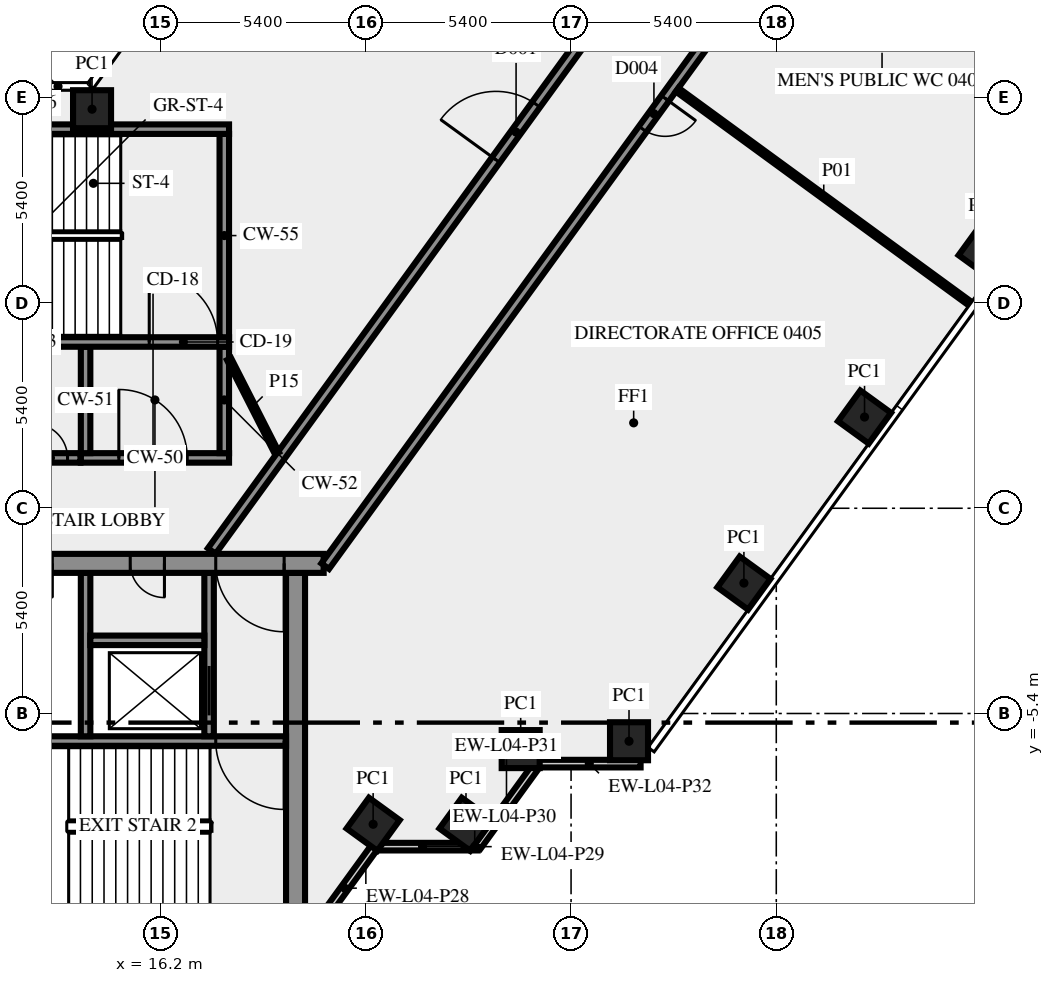
"""IFC4 building model, lengths in metres.
Left out: names, types, materials, properties, quantities, classifications, styles, units other than length and angle.
Written with IfcOpenShell. Run it as: python <this file> out.ifc"""

import sys

from ifc_helpers import new_model, si_unit, direction, frame, frame_2d, origin, origin_2d, place, context, subcontext, project, spatial, rectangle, extrude, element, fill, save


model = new_model("IFC4")
c1 = context("Model", 3, precision=1e-05, world=origin(), true_north=direction((0.0, 1.0)))
c2 = subcontext(c1, "Body", "Model", "MODEL_VIEW")
j1 = project(units=[si_unit("LENGTHUNIT", "METRE"), si_unit("PLANEANGLEUNIT", "RADIAN")], contexts=[c1])
p1 = place(None, origin())
s1 = spatial("IfcSite", under=j1, at=p1, CompositionType="ELEMENT")
p2 = place(p1, origin())
s2 = spatial("IfcBuilding", under=s1, at=p2, CompositionType="ELEMENT")
p3 = place(p2, frame((0.0, 0.0, 20.5)))
s3 = spatial("IfcBuildingStorey", under=s2, at=p3, CompositionType="ELEMENT", Elevation=20.5)
for number, where, z_axis, x_axis in (
    (1, (21.792, -8.315, 0.0), (0.0, 0.0, 1.0), (0.588, 0.809, 0.0)),
    (2, (24.235, -8.315, 0.0), (0.0, 0.0, 1.0), (0.588, 0.809, 0.0)),
    (3, (25.674, -6.337, 0.0), (0.0, 0.0, 1.0), (1.0, 0.0, 0.0)),
    (4, (28.525, -6.13, 0.0), (0.0, 0.0, 1.0), (1.0, 0.0, 0.0)),
    (5, (31.548, -1.969, 0.0), (0.0, 0.0, 1.0), (0.588, 0.809, 0.0)),
    (6, (34.722, 2.4, 0.0), (0.0, 0.0, 1.0), (0.588, 0.809, 0.0)),
    (7, (37.896, 6.769, 0.0), (0.0, 0.0, 1.0), (0.588, 0.809, 0.0)),
    (8, (14.395, 10.5, 0.0), (0.0, 0.0, 1.0), (-1.0, 0.0, 0.0)),
):
    element("IfcColumn", number, at=place(p3, frame(where, z_axis=z_axis, x_axis=x_axis)), inside=s3, PredefinedType="COLUMN", context=c2, shape_type="SweptSolid", body=[
        extrude(rectangle(XDim=1.0, YDim=1.0, at=origin_2d()), origin(), (0.0, 0.0, 1.0), 3.9),
    ])
p4 = place(p3, frame((20.253, -11.083, 0.0), z_axis=(0.0, 0.0, 1.0), x_axis=(0.587766567315, 0.809030569476, 0.0)))
e9 = element("IfcWall", 9, at=p4, inside=s3, PredefinedType="SOLIDWALL", context=c2, shape_type="SweptSolid", body=[
    extrude(rectangle(XDim=2.688, YDim=0.2, at=frame_2d((1.344, 0.0))), origin(), (0.0, 0.0, 1.0), 3.9),
])
p5 = place(p3, frame((21.943, -8.904, 0.0), z_axis=(0.0, 0.0, 1.0), x_axis=(1.0, 0.0, 0.0)))
e10 = element("IfcWall", 10, at=p5, inside=s3, PredefinedType="SOLIDWALL", context=c2, shape_type="SweptSolid", body=[
    extrude(rectangle(XDim=2.298, YDim=0.2, at=frame_2d((1.149, 0.0))), origin(), (0.0, 0.0, 1.0), 3.9),
])
p6 = place(p3, frame((24.387, -8.904, 0.0), z_axis=(0.0, 0.0, 1.0), x_axis=(1.0, 0.0, 0.0)))
e11 = element("IfcWall", 11, at=p6, inside=s3, PredefinedType="SOLIDWALL", context=c2, shape_type="SweptSolid", body=[
    extrude(rectangle(XDim=0.156, YDim=0.2, at=frame_2d((0.078, 0.0))), origin(), (0.0, 0.0, 1.0), 3.9),
])
p7 = place(p3, frame((24.54, -8.899, 0.0), z_axis=(0.0, 0.0, 1.0), x_axis=(0.587700286833, 0.809078718578, 0.0)))
e12 = element("IfcWall", 12, at=p7, inside=s3, PredefinedType="SOLIDWALL", context=c2, shape_type="SweptSolid", body=[
    extrude(rectangle(XDim=2.587, YDim=0.2, at=frame_2d((1.293, 0.0))), origin(), (0.0, 0.0, 1.0), 3.9),
])
p8 = place(p3, frame((26.13, -6.719, 0.0), z_axis=(0.0, 0.0, 1.0), x_axis=(1.0, 0.0, 0.0)))
e13 = element("IfcWall", 13, at=p8, inside=s3, PredefinedType="SOLIDWALL", context=c2, shape_type="SweptSolid", body=[
    extrude(rectangle(XDim=2.7, YDim=0.2, at=frame_2d((1.35, 0.0))), origin(), (0.0, 0.0, 1.0), 3.9),
])
p9 = place(p3, frame((19.75, -10.5, 0.0), z_axis=(0.0, 0.0, 1.0), x_axis=(0.0, 1.0, 0.0)))
e14 = element("IfcWall", 14, at=p9, inside=s3, PredefinedType="SHEAR", context=c2, shape_type="SweptSolid", body=[
    extrude(rectangle(XDim=8.8, YDim=0.5, at=frame_2d((4.4, 0.0))), origin(), (0.0, 0.0, 1.0), 3.9),
])
p10 = place(p3, frame((19.5, -6.125, 0.0), z_axis=(0.0, 0.0, 1.0), x_axis=(-1.0, 0.0, 0.0)))
e15 = element("IfcWall", 15, at=p10, inside=s3, PredefinedType="SHEAR", context=c2, shape_type="SweptSolid", body=[
    extrude(rectangle(XDim=8.05, YDim=0.25, at=frame_2d((4.025, 0.0))), origin(), (0.0, 0.0, 1.0), 3.9),
])
p11 = place(p10, frame((0.05, 0.0, 0.0)))
e16 = element("IfcOpeningElement", 16, at=p11, cuts=e15, PredefinedType="OPENING", context=c2, shape_type="SweptSolid", body=[
    extrude(rectangle(XDim=1.8, YDim=2.1, at=frame_2d((0.9, 1.05))), frame((0.0, 0.135, 0.0), z_axis=(0.0, -1.0, 0.0), x_axis=(1.0, 0.0, 0.0)), (0.0, 0.0, 1.0), 0.27),
])
p12 = place(p3, frame((14.225, -6.0, 0.0), z_axis=(0.0, 0.0, 1.0), x_axis=(0.0, 1.0, 0.0)))
e17 = element("IfcWall", 17, at=p12, inside=s3, PredefinedType="SHEAR", context=c2, shape_type="SweptSolid", body=[
    extrude(rectangle(XDim=4.3, YDim=0.25, at=frame_2d((2.15, 0.0))), origin(), (0.0, 0.0, 1.0), 3.9),
])
p13 = place(p3, frame((17.475, -6.0, 0.0), z_axis=(0.0, 0.0, 1.0), x_axis=(0.0, 1.0, 0.0)))
e18 = element("IfcWall", 18, at=p13, inside=s3, PredefinedType="SHEAR", context=c2, shape_type="SweptSolid", body=[
    extrude(rectangle(XDim=4.3, YDim=0.25, at=frame_2d((2.15, 0.0))), origin(), (0.0, 0.0, 1.0), 3.9),
])
p14 = place(p13, frame((0.55, 0.0, 0.0)))
e19 = element("IfcOpeningElement", 19, at=p14, cuts=e18, PredefinedType="OPENING", context=c2, shape_type="SweptSolid", body=[
    extrude(rectangle(XDim=1.3, YDim=2.1, at=frame_2d((0.65, 1.05))), frame((0.0, 0.135, 0.0), z_axis=(0.0, -1.0, 0.0), x_axis=(1.0, 0.0, 0.0)), (0.0, 0.0, 1.0), 0.27),
])
p15 = place(p3, frame((14.35, -3.475, 0.0), z_axis=(0.0, 0.0, 1.0), x_axis=(1.0, 0.0, 0.0)))
e20 = element("IfcWall", 20, at=p15, inside=s3, PredefinedType="SHEAR", context=c2, shape_type="SweptSolid", body=[
    extrude(rectangle(XDim=3.0, YDim=0.25, at=frame_2d((1.5, 0.0))), origin(), (0.0, 0.0, 1.0), 3.9),
])
p16 = place(p3, frame((20.49, -1.45, 0.0), z_axis=(0.0, 0.0, 1.0), x_axis=(-1.0, 0.0, 0.0)))
e21 = element("IfcWall", 21, at=p16, inside=s3, PredefinedType="SHEAR", context=c2, shape_type="SweptSolid", body=[
    extrude(rectangle(XDim=40.98, YDim=0.5, at=frame_2d((20.49, 0.0))), origin(), (0.0, 0.0, 1.0), 3.9),
])
p17 = place(p16, frame((38.14, 0.0, 0.0)))
e22 = element("IfcOpeningElement", 22, at=p17, cuts=e21, PredefinedType="OPENING", context=c2, shape_type="SweptSolid", body=[
    extrude(rectangle(XDim=1.8, YDim=2.1, at=frame_2d((0.9, 1.05))), frame((0.0, 0.26, 0.0), z_axis=(0.0, -1.0, 0.0), x_axis=(1.0, 0.0, 0.0)), (0.0, 0.0, 1.0), 0.52),
])
p18 = place(p16, frame((36.728, 0.0, 0.0)))
e23 = element("IfcOpeningElement", 23, at=p18, cuts=e21, PredefinedType="OPENING", context=c2, shape_type="SweptSolid", body=[
    extrude(rectangle(XDim=0.8, YDim=2.1, at=frame_2d((0.4, 1.05))), frame((0.0, 0.26, 0.0), z_axis=(0.0, -1.0, 0.0), x_axis=(1.0, 0.0, 0.0)), (0.0, 0.0, 1.0), 0.52),
])
p19 = place(p16, frame((35.153, 0.0, 0.0)))
e24 = element("IfcOpeningElement", 24, at=p19, cuts=e21, PredefinedType="OPENING", context=c2, shape_type="SweptSolid", body=[
    extrude(rectangle(XDim=0.8, YDim=2.1, at=frame_2d((0.4, 1.05))), frame((0.0, 0.26, 0.0), z_axis=(0.0, -1.0, 0.0), x_axis=(1.0, 0.0, 0.0)), (0.0, 0.0, 1.0), 0.52),
])
p20 = place(p16, frame((32.94, 0.0, 0.0)))
e25 = element("IfcOpeningElement", 25, at=p20, cuts=e21, PredefinedType="OPENING", context=c2, shape_type="SweptSolid", body=[
    extrude(rectangle(XDim=0.9, YDim=2.1, at=frame_2d((0.45, 1.05))), frame((0.0, 0.26, 0.0), z_axis=(0.0, -1.0, 0.0), x_axis=(1.0, 0.0, 0.0)), (0.0, 0.0, 1.0), 0.52),
])
p21 = place(p16, frame((19.59, 0.0, 0.0)))
e26 = element("IfcOpeningElement", 26, at=p21, cuts=e21, PredefinedType="OPENING", context=c2, shape_type="SweptSolid", body=[
    extrude(rectangle(XDim=2.0, YDim=2.1, at=frame_2d((1.0, 1.05))), frame((0.0, 0.26, 0.0), z_axis=(0.0, -1.0, 0.0), x_axis=(1.0, 0.0, 0.0)), (0.0, 0.0, 1.0), 0.52),
])
p22 = place(p16, frame((7.14, 0.0, 0.0)))
e27 = element("IfcOpeningElement", 27, at=p22, cuts=e21, PredefinedType="OPENING", context=c2, shape_type="SweptSolid", body=[
    extrude(rectangle(XDim=0.9, YDim=2.1, at=frame_2d((0.45, 1.05))), frame((0.0, 0.26, 0.0), z_axis=(0.0, -1.0, 0.0), x_axis=(1.0, 0.0, 0.0)), (0.0, 0.0, 1.0), 0.52),
])
p23 = place(p16, frame((4.19, 0.0, 0.0)))
e28 = element("IfcOpeningElement", 28, at=p23, cuts=e21, PredefinedType="OPENING", context=c2, shape_type="SweptSolid", body=[
    extrude(rectangle(XDim=0.9, YDim=2.1, at=frame_2d((0.45, 1.05))), frame((0.0, 0.26, 0.0), z_axis=(0.0, -1.0, 0.0), x_axis=(1.0, 0.0, 0.0)), (0.0, 0.0, 1.0), 0.52),
])
p24 = place(p16, frame((1.04, 0.0, 0.0)))
e29 = element("IfcOpeningElement", 29, at=p24, cuts=e21, PredefinedType="OPENING", context=c2, shape_type="SweptSolid", body=[
    extrude(rectangle(XDim=1.8, YDim=2.1, at=frame_2d((0.9, 1.05))), frame((0.0, 0.26, 0.0), z_axis=(0.0, -1.0, 0.0), x_axis=(1.0, 0.0, 0.0)), (0.0, 0.0, 1.0), 0.52),
])
p25 = place(p3, frame((14.1, 1.325, 0.0), z_axis=(0.0, 0.0, 1.0), x_axis=(1.0, 0.0, 0.0)))
e30 = element("IfcWall", 30, at=p25, inside=s3, PredefinedType="SHEAR", context=c2, shape_type="SweptSolid", body=[
    extrude(rectangle(XDim=3.9, YDim=0.25, at=frame_2d((1.95, 0.0))), origin(), (0.0, 0.0, 1.0), 3.9),
])
p26 = place(p25, frame((1.0, 0.0, 0.0)))
e31 = element("IfcOpeningElement", 31, at=p26, cuts=e30, PredefinedType="OPENING", context=c2, shape_type="SweptSolid", body=[
    extrude(rectangle(XDim=1.8, YDim=2.1, at=frame_2d((0.9, 1.05))), frame((0.0, 0.135, 0.0), z_axis=(0.0, -1.0, 0.0), x_axis=(1.0, 0.0, 0.0)), (0.0, 0.0, 1.0), 0.27),
])
for number, where, z_axis, x_axis in (
    (32, (14.225, 1.45, 0.0), (0.0, 0.0, 1.0), (0.0, 1.0, 0.0)),
    (33, (17.875, 1.45, 0.0), (0.0, 0.0, 1.0), (0.0, 1.0, 0.0)),
):
    element("IfcWall", number, at=place(p3, frame(where, z_axis=z_axis, x_axis=x_axis)), inside=s3, PredefinedType="SHEAR", context=c2, shape_type="SweptSolid", body=[
        extrude(rectangle(XDim=2.8, YDim=0.25, at=frame_2d((1.4, 0.0))), origin(), (0.0, 0.0, 1.0), 3.9),
    ])
p27 = place(p3, frame((7.5, 4.375, 0.0), z_axis=(0.0, 0.0, 1.0), x_axis=(1.0, 0.0, 0.0)))
e34 = element("IfcWall", 34, at=p27, inside=s3, PredefinedType="SHEAR", context=c2, shape_type="SweptSolid", body=[
    extrude(rectangle(XDim=10.5, YDim=0.25, at=frame_2d((5.25, 0.0))), origin(), (0.0, 0.0, 1.0), 3.9),
])
p28 = place(p27, frame((8.4, 0.0, 0.0)))
e35 = element("IfcOpeningElement", 35, at=p28, cuts=e34, PredefinedType="OPENING", context=c2, shape_type="SweptSolid", body=[
    extrude(rectangle(XDim=1.8, YDim=2.1, at=frame_2d((0.9, 1.05))), frame((0.0, 0.135, 0.0), z_axis=(0.0, -1.0, 0.0), x_axis=(1.0, 0.0, 0.0)), (0.0, 0.0, 1.0), 0.27),
])
p29 = place(p3, frame((17.875, 4.5, 0.0), z_axis=(0.0, 0.0, 1.0), x_axis=(0.0, 1.0, 0.0)))
e36 = element("IfcWall", 36, at=p29, inside=s3, PredefinedType="SHEAR", context=c2, shape_type="SweptSolid", body=[
    extrude(rectangle(XDim=5.35, YDim=0.25, at=frame_2d((2.675, 0.0))), origin(), (0.0, 0.0, 1.0), 3.9),
])
p30 = place(p3, frame((7.5, 9.975, 0.0), z_axis=(0.0, 0.0, 1.0), x_axis=(1.0, 0.0, 0.0)))
e37 = element("IfcWall", 37, at=p30, inside=s3, PredefinedType="SHEAR", context=c2, shape_type="SweptSolid", body=[
    extrude(rectangle(XDim=10.5, YDim=0.25, at=frame_2d((5.25, 0.0))), origin(), (0.0, 0.0, 1.0), 3.9),
])
p31 = place(p30, frame((2.0, 0.0, 1.0)))
e38 = element("IfcOpeningElement", 38, at=p31, cuts=e37, PredefinedType="OPENING", context=c2, shape_type="SweptSolid", body=[
    extrude(rectangle(XDim=1.2, YDim=1.2, at=frame_2d((0.6, 0.6))), frame((0.0, 0.135, 0.0), z_axis=(0.0, -1.0, 0.0), x_axis=(1.0, 0.0, 0.0)), (0.0, 0.0, 1.0), 0.27),
])
p32 = place(p3, frame((49.869, 38.856, 0.0), z_axis=(0.0, 0.0, 1.0), x_axis=(-0.587784522481, -0.809017524614, 0.0)))
e39 = element("IfcWall", 39, at=p32, inside=s3, PredefinedType="SOLIDWALL", context=c2, shape_type="SweptSolid", body=[
    extrude(rectangle(XDim=49.912, YDim=0.25, at=frame_2d((24.956, 0.0))), origin(), (0.0, 0.0, 1.0), 3.9),
])
p33 = place(p32, frame((27.946, 0.0, 0.0)))
e40 = element("IfcOpeningElement", 40, at=p33, cuts=e39, PredefinedType="OPENING", context=c2, shape_type="SweptSolid", body=[
    extrude(rectangle(XDim=0.9, YDim=2.1, at=frame_2d((0.45, 1.05))), frame((0.0, 0.135, 0.0), z_axis=(0.0, -1.0, 0.0), x_axis=(1.0, 0.0, 0.0)), (0.0, 0.0, 1.0), 0.27),
])
p34 = place(p32, frame((34.697, 0.0, 0.0)))
e41 = element("IfcOpeningElement", 41, at=p34, cuts=e39, PredefinedType="OPENING", context=c2, shape_type="SweptSolid", body=[
    extrude(rectangle(XDim=1.0, YDim=2.1, at=frame_2d((0.5, 1.05))), frame((0.0, 0.135, 0.0), z_axis=(0.0, -1.0, 0.0), x_axis=(1.0, 0.0, 0.0)), (0.0, 0.0, 1.0), 0.27),
])
p35 = place(p32, frame((15.797, 0.0, 0.0)))
e42 = element("IfcOpeningElement", 42, at=p35, cuts=e39, PredefinedType="OPENING", context=c2, shape_type="SweptSolid", body=[
    extrude(rectangle(XDim=0.9, YDim=2.1, at=frame_2d((0.45, 1.05))), frame((0.0, 0.135, 0.0), z_axis=(0.0, -1.0, 0.0), x_axis=(1.0, 0.0, 0.0)), (0.0, 0.0, 1.0), 0.27),
])
p36 = place(p32, frame((14.196, 0.0, 0.0)))
e43 = element("IfcOpeningElement", 43, at=p36, cuts=e39, PredefinedType="OPENING", context=c2, shape_type="SweptSolid", body=[
    extrude(rectangle(XDim=0.9, YDim=2.1, at=frame_2d((0.45, 1.05))), frame((0.0, 0.135, 0.0), z_axis=(0.0, -1.0, 0.0), x_axis=(1.0, 0.0, 0.0)), (0.0, 0.0, 1.0), 0.27),
])
p37 = place(p3, frame((-14.09, 1.325, 0.0), z_axis=(0.0, 0.0, 1.0), x_axis=(1.0, 0.0, 0.0)))
e44 = element("IfcWall", 44, at=p37, inside=s3, PredefinedType="SOLIDWALL", context=c2, shape_type="SweptSolid", body=[
    extrude(rectangle(XDim=28.18, YDim=0.25, at=frame_2d((14.09, 0.0))), origin(), (0.0, 0.0, 1.0), 3.9),
])
p38 = place(p37, frame((26.94, 0.0, 0.0)))
e45 = element("IfcOpeningElement", 45, at=p38, cuts=e44, PredefinedType="OPENING", context=c2, shape_type="SweptSolid", body=[
    extrude(rectangle(XDim=0.9, YDim=2.1, at=frame_2d((0.45, 1.05))), frame((0.0, 0.135, 0.0), z_axis=(0.0, -1.0, 0.0), x_axis=(1.0, 0.0, 0.0)), (0.0, 0.0, 1.0), 0.27),
])
p39 = place(p37, frame((9.739, 0.0, 0.0)))
e46 = element("IfcOpeningElement", 46, at=p39, cuts=e44, PredefinedType="OPENING", context=c2, shape_type="SweptSolid", body=[
    extrude(rectangle(XDim=1.8, YDim=2.1, at=frame_2d((0.9, 1.05))), frame((0.0, 0.135, 0.0), z_axis=(0.0, -1.0, 0.0), x_axis=(1.0, 0.0, 0.0)), (0.0, 0.0, 1.0), 0.27),
])
p40 = place(p3, frame((17.545, -1.125, 0.0), z_axis=(0.0, 0.0, 1.0), x_axis=(0.587786323093, 0.809016216391, 0.0)))
e47 = element("IfcWall", 47, at=p40, inside=s3, PredefinedType="SOLIDWALL", context=c2, shape_type="SweptSolid", body=[
    extrude(rectangle(XDim=33.493, YDim=0.25, at=frame_2d((16.747, 0.0))), origin(), (0.0, 0.0, 1.0), 3.9),
])
p41 = place(p40, frame((24.508, 0.0, 0.0)))
e48 = element("IfcOpeningElement", 48, at=p41, cuts=e47, PredefinedType="OPENING", context=c2, shape_type="SweptSolid", body=[
    extrude(rectangle(XDim=0.9, YDim=2.1, at=frame_2d((0.45, 1.05))), frame((0.0, 0.135, 0.0), z_axis=(0.0, -1.0, 0.0), x_axis=(1.0, 0.0, 0.0)), (0.0, 0.0, 1.0), 0.27),
])
p42 = place(p40, frame((12.724, 0.0, 0.0)))
e49 = element("IfcOpeningElement", 49, at=p42, cuts=e47, PredefinedType="OPENING", context=c2, shape_type="SweptSolid", body=[
    extrude(rectangle(XDim=1.8, YDim=2.1, at=frame_2d((0.9, 1.05))), frame((0.0, 0.135, 0.0), z_axis=(0.0, -1.0, 0.0), x_axis=(1.0, 0.0, 0.0)), (0.0, 0.0, 1.0), 0.27),
])
p43 = place(p3, frame((29.793, 11.012, 0.0), z_axis=(0.0, 0.0, 1.0), x_axis=(0.807645841498, -0.589667868135, 0.0)))
e50 = element("IfcWall", 50, at=p43, inside=s3, PredefinedType="PARTITIONING", context=c2, shape_type="SweptSolid", body=[
    extrude(rectangle(XDim=9.551, YDim=0.12, at=frame_2d((4.775, 0.0))), origin(), (0.0, 0.0, 1.0), 2.9),
])
p44 = place(p3, frame((40.573, 11.474, 0.0), z_axis=(0.0, 0.0, 1.0), x_axis=(-0.808992136407, 0.587819464829, 0.0)))
e51 = element("IfcWall", 51, at=p44, inside=s3, PredefinedType="PARTITIONING", context=c2, shape_type="SweptSolid", body=[
    extrude(rectangle(XDim=8.45, YDim=0.15, at=frame_2d((4.225, 0.0))), origin(), (0.0, 0.0, 1.0), 3.9),
])
p45 = place(p3, frame((18.0, 3.925, 0.0), z_axis=(0.0, 0.0, 1.0), x_axis=(0.453950796792, -0.891026752736, 0.0)))
e52 = element("IfcWall", 52, at=p45, inside=s3, PredefinedType="PARTITIONING", context=c2, shape_type="SweptSolid", body=[
    extrude(rectangle(XDim=2.778, YDim=0.12, at=frame_2d((1.389, 0.0))), origin(), (0.0, 0.0, 1.0), 3.9),
])
p46 = place(p11, origin())
e53 = element("IfcDoor", 53, at=p46, inside=s3, OperationType="DOUBLE_DOOR_SINGLE_SWING", PredefinedType="DOOR", context=c2, shape_type="SweptSolid", body=[
    extrude(rectangle(XDim=1.8, YDim=2.1, at=frame_2d((0.9, 1.05))), frame((0.0, 0.025, 0.0), z_axis=(0.0, -1.0, 0.0), x_axis=(1.0, 0.0, 0.0)), (0.0, 0.0, 1.0), 0.05),
])
fill(e16, e53)
p47 = place(p14, origin())
e54 = element("IfcDoor", 54, at=p47, inside=s3, OperationType="DOUBLE_DOOR_SLIDING", PredefinedType="DOOR", context=c2, shape_type="SweptSolid", body=[
    extrude(rectangle(XDim=1.3, YDim=2.1, at=frame_2d((0.65, 1.05))), frame((0.0, 0.025, 0.0), z_axis=(0.0, -1.0, 0.0), x_axis=(1.0, 0.0, 0.0)), (0.0, 0.0, 1.0), 0.05),
])
fill(e19, e54)
p48 = place(p23, origin())
e55 = element("IfcDoor", 55, at=p48, inside=s3, OperationType="SINGLE_SWING_LEFT", PredefinedType="DOOR", context=c2, shape_type="SweptSolid", body=[
    extrude(rectangle(XDim=0.9, YDim=2.1, at=frame_2d((0.45, 1.05))), frame((0.0, 0.025, 0.0), z_axis=(0.0, -1.0, 0.0), x_axis=(1.0, 0.0, 0.0)), (0.0, 0.0, 1.0), 0.05),
])
fill(e28, e55)
p49 = place(p24, origin())
e56 = element("IfcDoor", 56, at=p49, inside=s3, OperationType="DOUBLE_DOOR_SINGLE_SWING", PredefinedType="DOOR", context=c2, shape_type="SweptSolid", body=[
    extrude(rectangle(XDim=1.8, YDim=2.1, at=frame_2d((0.9, 1.05))), frame((0.0, 0.025, 0.0), z_axis=(0.0, -1.0, 0.0), x_axis=(1.0, 0.0, 0.0)), (0.0, 0.0, 1.0), 0.05),
])
fill(e29, e56)
p50 = place(p26, origin())
e57 = element("IfcDoor", 57, at=p50, inside=s3, OperationType="DOUBLE_DOOR_SINGLE_SWING", PredefinedType="DOOR", context=c2, shape_type="SweptSolid", body=[
    extrude(rectangle(XDim=1.8, YDim=2.1, at=frame_2d((0.9, 1.05))), frame((0.0, 0.025, 0.0), z_axis=(0.0, -1.0, 0.0), x_axis=(1.0, 0.0, 0.0)), (0.0, 0.0, 1.0), 0.05),
])
fill(e31, e57)
p51 = place(p28, origin())
e58 = element("IfcDoor", 58, at=p51, inside=s3, OperationType="DOUBLE_DOOR_SINGLE_SWING", PredefinedType="DOOR", context=c2, shape_type="SweptSolid", body=[
    extrude(rectangle(XDim=1.8, YDim=2.1, at=frame_2d((0.9, 1.05))), frame((0.0, 0.025, 0.0), z_axis=(0.0, -1.0, 0.0), x_axis=(1.0, 0.0, 0.0)), (0.0, 0.0, 1.0), 0.05),
])
fill(e35, e58)
p52 = place(p34, origin())
e59 = element("IfcDoor", 59, at=p52, inside=s3, OperationType="SINGLE_SWING_LEFT", PredefinedType="DOOR", context=c2, shape_type="SweptSolid", body=[
    extrude(rectangle(XDim=1.0, YDim=2.1, at=frame_2d((0.5, 1.05))), frame((0.0, 0.025, 0.0), z_axis=(0.0, -1.0, 0.0), x_axis=(1.0, 0.0, 0.0)), (0.0, 0.0, 1.0), 0.05),
])
fill(e41, e59)
p53 = place(p38, origin())
e60 = element("IfcDoor", 60, at=p53, inside=s3, OperationType="SINGLE_SWING_RIGHT", PredefinedType="DOOR", context=c2, shape_type="SweptSolid", body=[
    extrude(rectangle(XDim=0.9, YDim=2.1, at=frame_2d((0.45, 1.05))), frame((0.0, 0.025, 0.0), z_axis=(0.0, -1.0, 0.0), x_axis=(1.0, 0.0, 0.0)), (0.0, 0.0, 1.0), 0.05),
])
fill(e45, e60)
p54 = place(p42, origin())
e61 = element("IfcDoor", 61, at=p54, inside=s3, OperationType="DOUBLE_DOOR_SINGLE_SWING", PredefinedType="DOOR", context=c2, shape_type="SweptSolid", body=[
    extrude(rectangle(XDim=1.8, YDim=2.1, at=frame_2d((0.9, 1.05))), frame((0.0, 0.025, 0.0), z_axis=(0.0, -1.0, 0.0), x_axis=(1.0, 0.0, 0.0)), (0.0, 0.0, 1.0), 0.05),
])
fill(e49, e61)
save(model, sys.argv[1])
